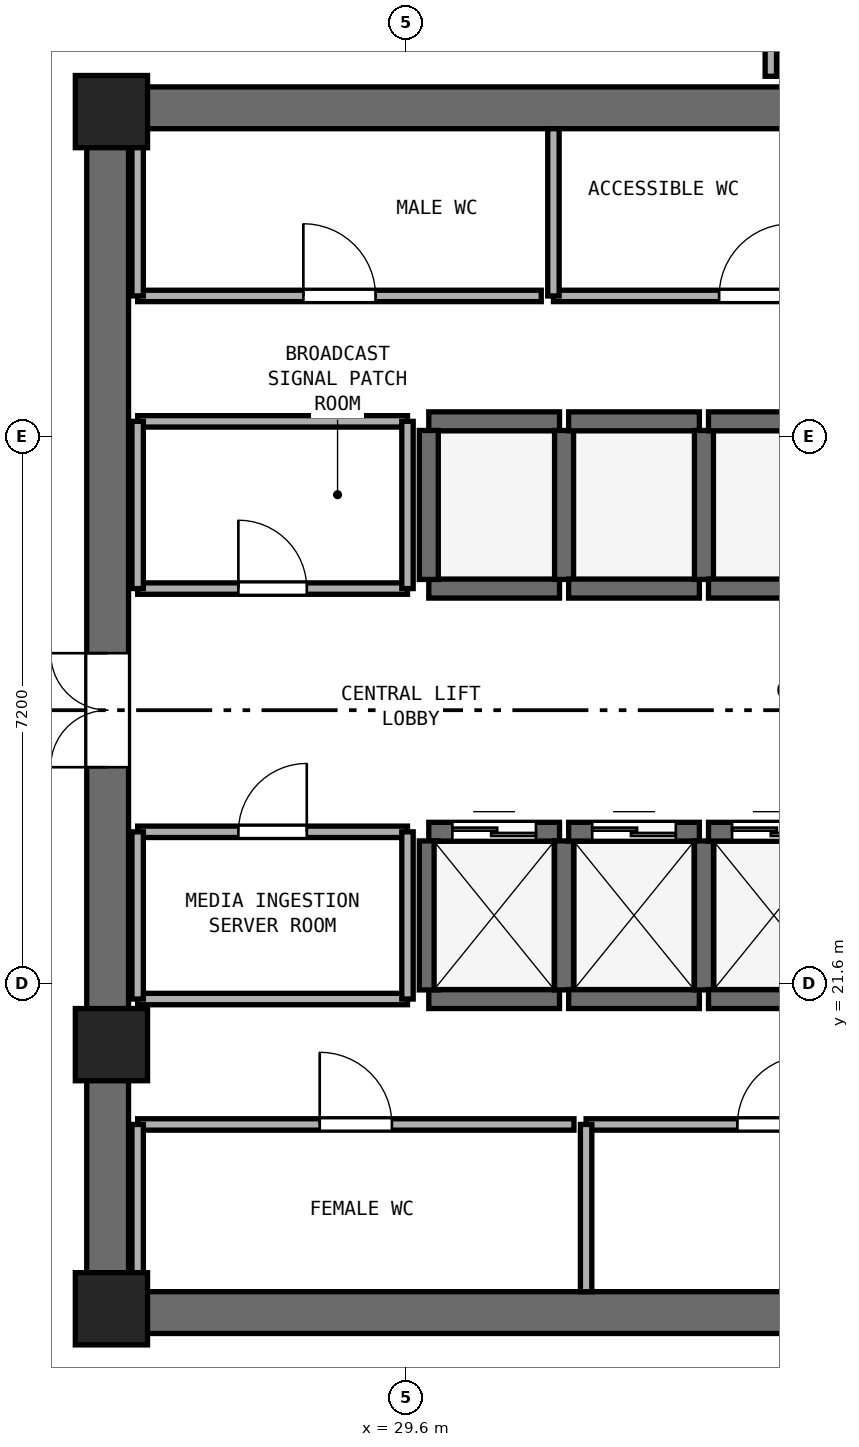
"""IFC4 building model, lengths in metres.
Left out: names, types, materials, properties, quantities, classifications, styles, units other than length and angle.
Written with IfcOpenShell. Run it as: python <this file> out.ifc"""

import sys

from ifc_helpers import new_model, si_unit, direction, frame, frame_2d, origin, origin_2d, place, context, subcontext, project, spatial, rectangle, extrude, element, fill, save


model = new_model("IFC4")
c1 = context("Model", 3, precision=1e-05, world=origin(), true_north=direction((0.0, 1.0)))
c2 = subcontext(c1, "Body", "Model", "MODEL_VIEW")
j1 = project(units=[si_unit("LENGTHUNIT", "METRE"), si_unit("PLANEANGLEUNIT", "RADIAN")], contexts=[c1])
p1 = place(None, origin())
s1 = spatial("IfcSite", under=j1, at=p1, CompositionType="ELEMENT")
p2 = place(p1, origin())
s2 = spatial("IfcBuilding", under=s1, at=p2, CompositionType="ELEMENT")
p3 = place(p2, frame((0.0, 0.0, 182.0)))
s3 = spatial("IfcBuildingStorey", under=s2, at=p3, CompositionType="ELEMENT", Elevation=182.0)
for number, where, z_axis, x_axis in (
    (1, (25.4, 17.275, 0.0), (0.0, 0.0, 1.0), (1.0, 0.0, 0.0)),
    (2, (25.4, 33.125, 0.0), (0.0, 0.0, 1.0), (1.0, 0.0, 0.0)),
):
    element("IfcWall", number, at=place(p3, frame(where, z_axis=z_axis, x_axis=x_axis)), inside=s3, PredefinedType="SHEAR", context=c2, shape_type="SweptSolid", body=[
        extrude(rectangle(XDim=23.2, YDim=0.55, at=frame_2d((11.6, 0.0))), origin(), (0.0, 0.0, 1.0), 3.54),
    ])
p4 = place(p3, frame((25.675, 17.55, 0.0), z_axis=(0.0, 0.0, 1.0), x_axis=(0.0, 1.0, 0.0)))
e3 = element("IfcWall", 3, at=p4, inside=s3, PredefinedType="SHEAR", context=c2, shape_type="SweptSolid", body=[
    extrude(rectangle(XDim=15.3, YDim=0.55, at=frame_2d((7.65, 0.0))), origin(), (0.0, 0.0, 1.0), 3.54),
])
p5 = place(p4, frame((6.9, 0.0, 0.0)))
e4 = element("IfcOpeningElement", 4, at=p5, cuts=e3, PredefinedType="OPENING", context=c2, shape_type="SweptSolid", body=[
    extrude(rectangle(XDim=1.5, YDim=2.15, at=frame_2d((0.75, 1.075))), frame((0.0, 0.285, 0.0), z_axis=(0.0, -1.0, 0.0), x_axis=(1.0, 0.0, 0.0)), (0.0, 0.0, 1.0), 0.57),
])
for number, where, z_axis, x_axis in (
    (5, (25.725, 17.325, 0.0), (0.0, 0.0, 1.0), (1.0, 0.0, 0.0)),
    (6, (25.725, 33.075, 0.0), (0.0, 0.0, 1.0), (1.0, 0.0, 0.0)),
    (7, (25.725, 20.8, 0.0), (0.0, 0.0, 1.0), (1.0, 0.0, 0.0)),
):
    element("IfcColumn", number, at=place(p3, frame(where, z_axis=z_axis, x_axis=x_axis)), inside=s3, PredefinedType="PILASTER", context=c2, shape_type="SweptSolid", body=[
        extrude(rectangle(XDim=0.95, YDim=0.95, at=origin_2d()), origin(), (0.0, 0.0, 1.0), 3.8),
    ])
p6 = place(p3, frame((29.9, 21.4, 0.0), z_axis=(0.0, 0.0, 1.0), x_axis=(1.0, 0.0, 0.0)))
e8 = element("IfcWall", 8, at=p6, inside=s3, PredefinedType="SHEAR", context=c2, shape_type="SweptSolid", body=[
    extrude(rectangle(XDim=1.72, YDim=0.25, at=frame_2d((0.86, 0.0))), origin(), (0.0, 0.0, 1.0), 3.54),
])
p7 = place(p3, frame((29.9, 23.6, 0.0), z_axis=(0.0, 0.0, 1.0), x_axis=(1.0, 0.0, 0.0)))
e9 = element("IfcWall", 9, at=p7, inside=s3, PredefinedType="SHEAR", context=c2, shape_type="SweptSolid", body=[
    extrude(rectangle(XDim=1.72, YDim=0.25, at=frame_2d((0.86, 0.0))), origin(), (0.0, 0.0, 1.0), 3.54),
])
p8 = place(p7, frame((0.31, 0.0, 0.0)))
e10 = element("IfcOpeningElement", 10, at=p8, cuts=e9, PredefinedType="OPENING", context=c2, shape_type="SweptSolid", body=[
    extrude(rectangle(XDim=1.1, YDim=2.15, at=frame_2d((0.55, 1.075))), frame((0.0, 0.135, 0.0), z_axis=(0.0, -1.0, 0.0), x_axis=(1.0, 0.0, 0.0)), (0.0, 0.0, 1.0), 0.27),
])
for number, where, z_axis, x_axis in (
    (11, (29.9, 21.52, 0.0), (0.0, 0.0, 1.0), (0.0, 1.0, 0.0)),
    (12, (31.68, 21.52, 0.0), (0.0, 0.0, 1.0), (0.0, 1.0, 0.0)),
):
    element("IfcWall", number, at=place(p3, frame(where, z_axis=z_axis, x_axis=x_axis)), inside=s3, PredefinedType="SHEAR", context=c2, shape_type="SweptSolid", body=[
        extrude(rectangle(XDim=1.96, YDim=0.25, at=frame_2d((0.98, 0.0))), origin(), (0.0, 0.0, 1.0), 3.54),
    ])
p9 = place(p3, frame((31.74, 21.4, 0.0), z_axis=(0.0, 0.0, 1.0), x_axis=(1.0, 0.0, 0.0)))
e13 = element("IfcWall", 13, at=p9, inside=s3, PredefinedType="SHEAR", context=c2, shape_type="SweptSolid", body=[
    extrude(rectangle(XDim=1.72, YDim=0.25, at=frame_2d((0.86, 0.0))), origin(), (0.0, 0.0, 1.0), 3.54),
])
p10 = place(p3, frame((31.74, 23.6, 0.0), z_axis=(0.0, 0.0, 1.0), x_axis=(1.0, 0.0, 0.0)))
e14 = element("IfcWall", 14, at=p10, inside=s3, PredefinedType="SHEAR", context=c2, shape_type="SweptSolid", body=[
    extrude(rectangle(XDim=1.72, YDim=0.25, at=frame_2d((0.86, 0.0))), origin(), (0.0, 0.0, 1.0), 3.54),
])
p11 = place(p10, frame((0.31, 0.0, 0.0)))
e15 = element("IfcOpeningElement", 15, at=p11, cuts=e14, PredefinedType="OPENING", context=c2, shape_type="SweptSolid", body=[
    extrude(rectangle(XDim=1.1, YDim=2.15, at=frame_2d((0.55, 1.075))), frame((0.0, 0.135, 0.0), z_axis=(0.0, -1.0, 0.0), x_axis=(1.0, 0.0, 0.0)), (0.0, 0.0, 1.0), 0.27),
])
p12 = place(p3, frame((33.52, 21.52, 0.0), z_axis=(0.0, 0.0, 1.0), x_axis=(0.0, 1.0, 0.0)))
e16 = element("IfcWall", 16, at=p12, inside=s3, PredefinedType="SHEAR", context=c2, shape_type="SweptSolid", body=[
    extrude(rectangle(XDim=1.96, YDim=0.25, at=frame_2d((0.98, 0.0))), origin(), (0.0, 0.0, 1.0), 3.54),
])
p13 = place(p3, frame((33.58, 21.4, 0.0), z_axis=(0.0, 0.0, 1.0), x_axis=(1.0, 0.0, 0.0)))
e17 = element("IfcWall", 17, at=p13, inside=s3, PredefinedType="SHEAR", context=c2, shape_type="SweptSolid", body=[
    extrude(rectangle(XDim=1.72, YDim=0.25, at=frame_2d((0.86, 0.0))), origin(), (0.0, 0.0, 1.0), 3.54),
])
p14 = place(p3, frame((33.58, 23.6, 0.0), z_axis=(0.0, 0.0, 1.0), x_axis=(1.0, 0.0, 0.0)))
e18 = element("IfcWall", 18, at=p14, inside=s3, PredefinedType="SHEAR", context=c2, shape_type="SweptSolid", body=[
    extrude(rectangle(XDim=1.72, YDim=0.25, at=frame_2d((0.86, 0.0))), origin(), (0.0, 0.0, 1.0), 3.54),
])
p15 = place(p14, frame((0.31, 0.0, 0.0)))
e19 = element("IfcOpeningElement", 19, at=p15, cuts=e18, PredefinedType="OPENING", context=c2, shape_type="SweptSolid", body=[
    extrude(rectangle(XDim=1.1, YDim=2.15, at=frame_2d((0.55, 1.075))), frame((0.0, 0.135, 0.0), z_axis=(0.0, -1.0, 0.0), x_axis=(1.0, 0.0, 0.0)), (0.0, 0.0, 1.0), 0.27),
])
for number, where, z_axis, x_axis in (
    (20, (29.9, 26.8, 0.0), (0.0, 0.0, 1.0), (1.0, 0.0, 0.0)),
    (21, (29.9, 29.0, 0.0), (0.0, 0.0, 1.0), (1.0, 0.0, 0.0)),
):
    element("IfcWall", number, at=place(p3, frame(where, z_axis=z_axis, x_axis=x_axis)), inside=s3, PredefinedType="SHEAR", context=c2, shape_type="SweptSolid", body=[
        extrude(rectangle(XDim=1.72, YDim=0.25, at=frame_2d((0.86, 0.0))), origin(), (0.0, 0.0, 1.0), 3.54),
    ])
for number, where, z_axis, x_axis in (
    (22, (29.9, 26.92, 0.0), (0.0, 0.0, 1.0), (0.0, 1.0, 0.0)),
    (23, (31.68, 26.92, 0.0), (0.0, 0.0, 1.0), (0.0, 1.0, 0.0)),
):
    element("IfcWall", number, at=place(p3, frame(where, z_axis=z_axis, x_axis=x_axis)), inside=s3, PredefinedType="SHEAR", context=c2, shape_type="SweptSolid", body=[
        extrude(rectangle(XDim=1.96, YDim=0.25, at=frame_2d((0.98, 0.0))), origin(), (0.0, 0.0, 1.0), 3.54),
    ])
for number, where, z_axis, x_axis in (
    (24, (31.74, 26.8, 0.0), (0.0, 0.0, 1.0), (1.0, 0.0, 0.0)),
    (25, (31.74, 29.0, 0.0), (0.0, 0.0, 1.0), (1.0, 0.0, 0.0)),
):
    element("IfcWall", number, at=place(p3, frame(where, z_axis=z_axis, x_axis=x_axis)), inside=s3, PredefinedType="SHEAR", context=c2, shape_type="SweptSolid", body=[
        extrude(rectangle(XDim=1.72, YDim=0.25, at=frame_2d((0.86, 0.0))), origin(), (0.0, 0.0, 1.0), 3.54),
    ])
p16 = place(p3, frame((33.52, 26.92, 0.0), z_axis=(0.0, 0.0, 1.0), x_axis=(0.0, 1.0, 0.0)))
e26 = element("IfcWall", 26, at=p16, inside=s3, PredefinedType="SHEAR", context=c2, shape_type="SweptSolid", body=[
    extrude(rectangle(XDim=1.96, YDim=0.25, at=frame_2d((0.98, 0.0))), origin(), (0.0, 0.0, 1.0), 3.54),
])
for number, where, z_axis, x_axis in (
    (27, (33.58, 26.8, 0.0), (0.0, 0.0, 1.0), (1.0, 0.0, 0.0)),
    (28, (33.58, 29.0, 0.0), (0.0, 0.0, 1.0), (1.0, 0.0, 0.0)),
):
    element("IfcWall", number, at=place(p3, frame(where, z_axis=z_axis, x_axis=x_axis)), inside=s3, PredefinedType="SHEAR", context=c2, shape_type="SweptSolid", body=[
        extrude(rectangle(XDim=1.72, YDim=0.25, at=frame_2d((0.86, 0.0))), origin(), (0.0, 0.0, 1.0), 3.54),
    ])
p17 = place(p3, frame((26.07, 30.65, 0.0), z_axis=(0.0, 0.0, 1.0), x_axis=(1.0, 0.0, 0.0)))
e29 = element("IfcWall", 29, at=p17, inside=s3, PredefinedType="PARTITIONING", context=c2, shape_type="SweptSolid", body=[
    extrude(rectangle(XDim=5.31, YDim=0.15, at=frame_2d((2.655, 0.0))), origin(), (0.0, 0.0, 1.0), 3.54),
])
p18 = place(p17, frame((2.18, 0.0, 0.0)))
e30 = element("IfcOpeningElement", 30, at=p18, cuts=e29, PredefinedType="OPENING", context=c2, shape_type="SweptSolid", body=[
    extrude(rectangle(XDim=0.95, YDim=2.1, at=frame_2d((0.475, 1.05))), frame((0.0, 0.085, 0.0), z_axis=(0.0, -1.0, 0.0), x_axis=(1.0, 0.0, 0.0)), (0.0, 0.0, 1.0), 0.17),
])
p19 = place(p3, frame((26.07, 30.65, 0.0), z_axis=(0.0, 0.0, 1.0), x_axis=(0.0, 1.0, 0.0)))
e31 = element("IfcWall", 31, at=p19, inside=s3, PredefinedType="PARTITIONING", context=c2, shape_type="SweptSolid", body=[
    extrude(rectangle(XDim=2.2, YDim=0.15, at=frame_2d((1.1, 0.0))), origin(), (0.0, 0.0, 1.0), 2.64),
])
p20 = place(p3, frame((31.54, 30.65, 0.0), z_axis=(0.0, 0.0, 1.0), x_axis=(1.0, 0.0, 0.0)))
e32 = element("IfcWall", 32, at=p20, inside=s3, PredefinedType="PARTITIONING", context=c2, shape_type="SweptSolid", body=[
    extrude(rectangle(XDim=5.31, YDim=0.15, at=frame_2d((2.655, 0.0))), origin(), (0.0, 0.0, 1.0), 3.54),
])
p21 = place(p20, frame((2.18, 0.0, 0.0)))
e33 = element("IfcOpeningElement", 33, at=p21, cuts=e32, PredefinedType="OPENING", context=c2, shape_type="SweptSolid", body=[
    extrude(rectangle(XDim=0.95, YDim=2.1, at=frame_2d((0.475, 1.05))), frame((0.0, 0.085, 0.0), z_axis=(0.0, -1.0, 0.0), x_axis=(1.0, 0.0, 0.0)), (0.0, 0.0, 1.0), 0.17),
])
p22 = place(p3, frame((31.54, 30.65, 0.0), z_axis=(0.0, 0.0, 1.0), x_axis=(0.0, 1.0, 0.0)))
e34 = element("IfcWall", 34, at=p22, inside=s3, PredefinedType="PARTITIONING", context=c2, shape_type="SweptSolid", body=[
    extrude(rectangle(XDim=2.2, YDim=0.15, at=frame_2d((1.1, 0.0))), origin(), (0.0, 0.0, 1.0), 3.54),
])
p23 = place(p3, frame((26.07, 19.75, 0.0), z_axis=(0.0, 0.0, 1.0), x_axis=(1.0, 0.0, 0.0)))
e35 = element("IfcWall", 35, at=p23, inside=s3, PredefinedType="PARTITIONING", context=c2, shape_type="SweptSolid", body=[
    extrude(rectangle(XDim=5.74, YDim=0.15, at=frame_2d((2.87, 0.0))), origin(), (0.0, 0.0, 1.0), 3.54),
])
p24 = place(p23, frame((2.395, 0.0, 0.0)))
e36 = element("IfcOpeningElement", 36, at=p24, cuts=e35, PredefinedType="OPENING", context=c2, shape_type="SweptSolid", body=[
    extrude(rectangle(XDim=0.95, YDim=2.1, at=frame_2d((0.475, 1.05))), frame((0.0, 0.085, 0.0), z_axis=(0.0, -1.0, 0.0), x_axis=(1.0, 0.0, 0.0)), (0.0, 0.0, 1.0), 0.17),
])
p25 = place(p3, frame((26.07, 17.55, 0.0), z_axis=(0.0, 0.0, 1.0), x_axis=(0.0, 1.0, 0.0)))
e37 = element("IfcWall", 37, at=p25, inside=s3, PredefinedType="PARTITIONING", context=c2, shape_type="SweptSolid", body=[
    extrude(rectangle(XDim=2.2, YDim=0.15, at=frame_2d((1.1, 0.0))), origin(), (0.0, 0.0, 1.0), 2.64),
])
p26 = place(p3, frame((31.97, 19.75, 0.0), z_axis=(0.0, 0.0, 1.0), x_axis=(1.0, 0.0, 0.0)))
e38 = element("IfcWall", 38, at=p26, inside=s3, PredefinedType="PARTITIONING", context=c2, shape_type="SweptSolid", body=[
    extrude(rectangle(XDim=4.88, YDim=0.15, at=frame_2d((2.44, 0.0))), origin(), (0.0, 0.0, 1.0), 3.54),
])
p27 = place(p26, frame((1.99, 0.0, 0.0)))
e39 = element("IfcOpeningElement", 39, at=p27, cuts=e38, PredefinedType="OPENING", context=c2, shape_type="SweptSolid", body=[
    extrude(rectangle(XDim=0.9, YDim=2.1, at=frame_2d((0.45, 1.05))), frame((0.0, 0.085, 0.0), z_axis=(0.0, -1.0, 0.0), x_axis=(1.0, 0.0, 0.0)), (0.0, 0.0, 1.0), 0.17),
])
p28 = place(p3, frame((31.97, 17.55, 0.0), z_axis=(0.0, 0.0, 1.0), x_axis=(0.0, 1.0, 0.0)))
e40 = element("IfcWall", 40, at=p28, inside=s3, PredefinedType="PARTITIONING", context=c2, shape_type="SweptSolid", body=[
    extrude(rectangle(XDim=2.2, YDim=0.15, at=frame_2d((1.1, 0.0))), origin(), (0.0, 0.0, 1.0), 3.54),
])
p29 = place(p3, frame((26.07, 26.8, 0.0), z_axis=(0.0, 0.0, 1.0), x_axis=(1.0, 0.0, 0.0)))
e41 = element("IfcWall", 41, at=p29, inside=s3, PredefinedType="PARTITIONING", context=c2, shape_type="SweptSolid", body=[
    extrude(rectangle(XDim=3.55, YDim=0.15, at=frame_2d((1.775, 0.0))), origin(), (0.0, 0.0, 1.0), 3.54),
])
p30 = place(p29, frame((1.325, 0.0, 0.0)))
e42 = element("IfcOpeningElement", 42, at=p30, cuts=e41, PredefinedType="OPENING", context=c2, shape_type="SweptSolid", body=[
    extrude(rectangle(XDim=0.9, YDim=2.1, at=frame_2d((0.45, 1.05))), frame((0.0, 0.085, 0.0), z_axis=(0.0, -1.0, 0.0), x_axis=(1.0, 0.0, 0.0)), (0.0, 0.0, 1.0), 0.17),
])
p31 = place(p3, frame((26.07, 29.0, 0.0), z_axis=(0.0, 0.0, 1.0), x_axis=(1.0, 0.0, 0.0)))
e43 = element("IfcWall", 43, at=p31, inside=s3, PredefinedType="PARTITIONING", context=c2, shape_type="SweptSolid", body=[
    extrude(rectangle(XDim=3.55, YDim=0.15, at=frame_2d((1.775, 0.0))), origin(), (0.0, 0.0, 1.0), 3.54),
])
p32 = place(p3, frame((26.07, 26.8, 0.0), z_axis=(0.0, 0.0, 1.0), x_axis=(0.0, 1.0, 0.0)))
e44 = element("IfcWall", 44, at=p32, inside=s3, PredefinedType="PARTITIONING", context=c2, shape_type="SweptSolid", body=[
    extrude(rectangle(XDim=2.2, YDim=0.15, at=frame_2d((1.1, 0.0))), origin(), (0.0, 0.0, 1.0), 2.64),
])
p33 = place(p3, frame((29.62, 26.8, 0.0), z_axis=(0.0, 0.0, 1.0), x_axis=(0.0, 1.0, 0.0)))
e45 = element("IfcWall", 45, at=p33, inside=s3, PredefinedType="PARTITIONING", context=c2, shape_type="SweptSolid", body=[
    extrude(rectangle(XDim=2.2, YDim=0.15, at=frame_2d((1.1, 0.0))), origin(), (0.0, 0.0, 1.0), 3.54),
])
p34 = place(p3, frame((26.07, 21.4, 0.0), z_axis=(0.0, 0.0, 1.0), x_axis=(1.0, 0.0, 0.0)))
e46 = element("IfcWall", 46, at=p34, inside=s3, PredefinedType="PARTITIONING", context=c2, shape_type="SweptSolid", body=[
    extrude(rectangle(XDim=3.55, YDim=0.15, at=frame_2d((1.775, 0.0))), origin(), (0.0, 0.0, 1.0), 3.54),
])
p35 = place(p3, frame((26.07, 23.6, 0.0), z_axis=(0.0, 0.0, 1.0), x_axis=(1.0, 0.0, 0.0)))
e47 = element("IfcWall", 47, at=p35, inside=s3, PredefinedType="PARTITIONING", context=c2, shape_type="SweptSolid", body=[
    extrude(rectangle(XDim=3.55, YDim=0.15, at=frame_2d((1.775, 0.0))), origin(), (0.0, 0.0, 1.0), 3.54),
])
p36 = place(p35, frame((1.325, 0.0, 0.0)))
e48 = element("IfcOpeningElement", 48, at=p36, cuts=e47, PredefinedType="OPENING", context=c2, shape_type="SweptSolid", body=[
    extrude(rectangle(XDim=0.9, YDim=2.1, at=frame_2d((0.45, 1.05))), frame((0.0, 0.085, 0.0), z_axis=(0.0, -1.0, 0.0), x_axis=(1.0, 0.0, 0.0)), (0.0, 0.0, 1.0), 0.17),
])
p37 = place(p3, frame((26.07, 21.4, 0.0), z_axis=(0.0, 0.0, 1.0), x_axis=(0.0, 1.0, 0.0)))
e49 = element("IfcWall", 49, at=p37, inside=s3, PredefinedType="PARTITIONING", context=c2, shape_type="SweptSolid", body=[
    extrude(rectangle(XDim=2.2, YDim=0.15, at=frame_2d((1.1, 0.0))), origin(), (0.0, 0.0, 1.0), 2.64),
])
p38 = place(p3, frame((29.62, 21.4, 0.0), z_axis=(0.0, 0.0, 1.0), x_axis=(0.0, 1.0, 0.0)))
e50 = element("IfcWall", 50, at=p38, inside=s3, PredefinedType="PARTITIONING", context=c2, shape_type="SweptSolid", body=[
    extrude(rectangle(XDim=2.2, YDim=0.15, at=frame_2d((1.1, 0.0))), origin(), (0.0, 0.0, 1.0), 3.54),
])
p39 = place(p3, frame((34.4, 33.54, 0.0), z_axis=(0.0, 0.0, 1.0), x_axis=(0.0, 1.0, 0.0)))
e51 = element("IfcWall", 51, at=p39, inside=s3, PredefinedType="PARTITIONING", context=c2, shape_type="SweptSolid", body=[
    extrude(rectangle(XDim=3.71, YDim=0.15, at=frame_2d((1.855, 0.0))), origin(), (0.0, 0.0, 1.0), 3.54),
])
p40 = place(p39, frame((1.355, 0.0, 0.0)))
e52 = element("IfcOpeningElement", 52, at=p40, cuts=e51, PredefinedType="OPENING", context=c2, shape_type="SweptSolid", body=[
    extrude(rectangle(XDim=1.0, YDim=2.12, at=frame_2d((0.5, 1.06))), frame((0.0, 0.085, 0.0), z_axis=(0.0, -1.0, 0.0), x_axis=(1.0, 0.0, 0.0)), (0.0, 0.0, 1.0), 0.17),
])
p41 = place(p8, origin())
e53 = element("IfcDoor", 53, at=p41, inside=s3, OperationType="DOUBLE_DOOR_SLIDING", PredefinedType="DOOR", context=c2, shape_type="SweptSolid", body=[
    extrude(rectangle(XDim=1.1, YDim=2.15, at=frame_2d((0.55, 1.075))), frame((0.0, 0.025, 0.0), z_axis=(0.0, -1.0, 0.0), x_axis=(1.0, 0.0, 0.0)), (0.0, 0.0, 1.0), 0.05),
])
fill(e10, e53)
p42 = place(p11, origin())
e54 = element("IfcDoor", 54, at=p42, inside=s3, OperationType="DOUBLE_DOOR_SLIDING", PredefinedType="DOOR", context=c2, shape_type="SweptSolid", body=[
    extrude(rectangle(XDim=1.1, YDim=2.15, at=frame_2d((0.55, 1.075))), frame((0.0, 0.025, 0.0), z_axis=(0.0, -1.0, 0.0), x_axis=(1.0, 0.0, 0.0)), (0.0, 0.0, 1.0), 0.05),
])
fill(e15, e54)
p43 = place(p15, origin())
e55 = element("IfcDoor", 55, at=p43, inside=s3, OperationType="DOUBLE_DOOR_SLIDING", PredefinedType="DOOR", context=c2, shape_type="SweptSolid", body=[
    extrude(rectangle(XDim=1.1, YDim=2.15, at=frame_2d((0.55, 1.075))), frame((0.0, 0.025, 0.0), z_axis=(0.0, -1.0, 0.0), x_axis=(1.0, 0.0, 0.0)), (0.0, 0.0, 1.0), 0.05),
])
fill(e19, e55)
p44 = place(p5, origin())
e56 = element("IfcDoor", 56, at=p44, inside=s3, OperationType="DOUBLE_DOOR_SINGLE_SWING", PredefinedType="DOOR", context=c2, shape_type="SweptSolid", body=[
    extrude(rectangle(XDim=1.5, YDim=2.15, at=frame_2d((0.75, 1.075))), frame((0.0, 0.025, 0.0), z_axis=(0.0, -1.0, 0.0), x_axis=(1.0, 0.0, 0.0)), (0.0, 0.0, 1.0), 0.05),
])
fill(e4, e56)
p45 = place(p18, origin())
e57 = element("IfcDoor", 57, at=p45, inside=s3, OperationType="SINGLE_SWING_LEFT", PredefinedType="DOOR", context=c2, shape_type="SweptSolid", body=[
    extrude(rectangle(XDim=0.95, YDim=2.1, at=frame_2d((0.475, 1.05))), frame((0.0, 0.025, 0.0), z_axis=(0.0, -1.0, 0.0), x_axis=(1.0, 0.0, 0.0)), (0.0, 0.0, 1.0), 0.05),
])
fill(e30, e57)
p46 = place(p21, origin())
e58 = element("IfcDoor", 58, at=p46, inside=s3, OperationType="SINGLE_SWING_RIGHT", PredefinedType="DOOR", context=c2, shape_type="SweptSolid", body=[
    extrude(rectangle(XDim=0.95, YDim=2.1, at=frame_2d((0.475, 1.05))), frame((0.0, 0.025, 0.0), z_axis=(0.0, -1.0, 0.0), x_axis=(1.0, 0.0, 0.0)), (0.0, 0.0, 1.0), 0.05),
])
fill(e33, e58)
p47 = place(p24, origin())
e59 = element("IfcDoor", 59, at=p47, inside=s3, OperationType="SINGLE_SWING_LEFT", PredefinedType="DOOR", context=c2, shape_type="SweptSolid", body=[
    extrude(rectangle(XDim=0.95, YDim=2.1, at=frame_2d((0.475, 1.05))), frame((0.0, 0.025, 0.0), z_axis=(0.0, -1.0, 0.0), x_axis=(1.0, 0.0, 0.0)), (0.0, 0.0, 1.0), 0.05),
])
fill(e36, e59)
p48 = place(p27, origin())
e60 = element("IfcDoor", 60, at=p48, inside=s3, OperationType="SINGLE_SWING_RIGHT", PredefinedType="DOOR", context=c2, shape_type="SweptSolid", body=[
    extrude(rectangle(XDim=0.9, YDim=2.1, at=frame_2d((0.45, 1.05))), frame((0.0, 0.025, 0.0), z_axis=(0.0, -1.0, 0.0), x_axis=(1.0, 0.0, 0.0)), (0.0, 0.0, 1.0), 0.05),
])
fill(e39, e60)
p49 = place(p30, origin())
e61 = element("IfcDoor", 61, at=p49, inside=s3, OperationType="SINGLE_SWING_LEFT", PredefinedType="DOOR", context=c2, shape_type="SweptSolid", body=[
    extrude(rectangle(XDim=0.9, YDim=2.1, at=frame_2d((0.45, 1.05))), frame((0.0, 0.025, 0.0), z_axis=(0.0, -1.0, 0.0), x_axis=(1.0, 0.0, 0.0)), (0.0, 0.0, 1.0), 0.05),
])
fill(e42, e61)
p50 = place(p36, origin())
e62 = element("IfcDoor", 62, at=p50, inside=s3, OperationType="SINGLE_SWING_RIGHT", PredefinedType="DOOR", context=c2, shape_type="SweptSolid", body=[
    extrude(rectangle(XDim=0.9, YDim=2.1, at=frame_2d((0.45, 1.05))), frame((0.0, 0.025, 0.0), z_axis=(0.0, -1.0, 0.0), x_axis=(1.0, 0.0, 0.0)), (0.0, 0.0, 1.0), 0.05),
])
fill(e48, e62)
save(model, sys.argv[1])
